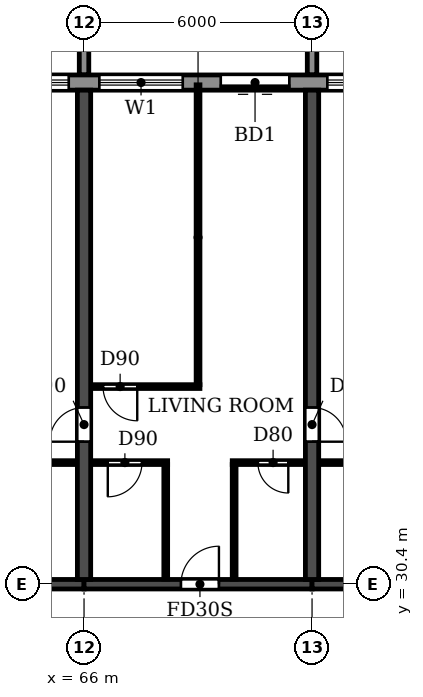
"""IFC4 building model, lengths in metres.
Left out: names, types, materials, properties, quantities, classifications, styles, units other than length and angle.
Written with IfcOpenShell. Run it as: python <this file> out.ifc"""

import sys

from ifc_helpers import new_model, si_unit, direction, frame, frame_2d, origin, place, context, subcontext, project, spatial, polyline, rectangle, outline, extrude, source, transform, mapped, element, fill, save


model = new_model("IFC4")
c1 = context("Model", 3, precision=1e-05, world=origin(), true_north=direction((0.0, 1.0)))
c2 = subcontext(c1, "Body", "Model", "MODEL_VIEW")
j1 = project(units=[si_unit("LENGTHUNIT", "METRE"), si_unit("PLANEANGLEUNIT", "RADIAN")], contexts=[c1])
p1 = place(None, origin())
s1 = spatial("IfcSite", under=j1, at=p1, CompositionType="ELEMENT")
p2 = place(p1, origin())
s2 = spatial("IfcBuilding", under=s1, at=p2, CompositionType="ELEMENT")
p3 = place(p2, frame((0.0, 0.0, 72.9)))
s3 = spatial("IfcBuildingStorey", under=s2, at=p3, CompositionType="ELEMENT", Elevation=72.9)
p4 = place(p3, frame((66.0, 30.525, 0.0), z_axis=(0.0, 0.0, 1.0), x_axis=(0.0, 1.0, 0.0)))
e1 = element("IfcWall", 1, at=p4, inside=s3, PredefinedType="SHEAR", context=c2, shape_type="SweptSolid", body=[
    extrude(rectangle(XDim=12.875, YDim=0.35, at=frame_2d((6.438, 0.0))), origin(), (0.0, 0.0, 1.0), 3.06),
])
p5 = place(p4, frame((3.625, 0.0, 0.0)))
e2 = element("IfcOpeningElement", 2, at=p5, cuts=e1, PredefinedType="OPENING", context=c2, shape_type="SweptSolid", body=[
    extrude(rectangle(XDim=0.9, YDim=2.1, at=frame_2d((0.45, 1.05))), frame((0.0, 0.185, 0.0), z_axis=(0.0, -1.0, 0.0), x_axis=(1.0, 0.0, 0.0)), (0.0, 0.0, 1.0), 0.37),
])
p6 = place(p3, frame((72.0, 30.525, 0.0), z_axis=(0.0, 0.0, 1.0), x_axis=(0.0, 1.0, 0.0)))
e3 = element("IfcWall", 3, at=p6, inside=s3, PredefinedType="SHEAR", context=c2, shape_type="SweptSolid", body=[
    extrude(rectangle(XDim=12.875, YDim=0.35, at=frame_2d((6.438, 0.0))), origin(), (0.0, 0.0, 1.0), 3.06),
])
p7 = place(p6, frame((3.625, 0.0, 0.0)))
e4 = element("IfcOpeningElement", 4, at=p7, cuts=e3, PredefinedType="OPENING", context=c2, shape_type="SweptSolid", body=[
    extrude(rectangle(XDim=0.9, YDim=2.1, at=frame_2d((0.45, 1.05))), frame((0.0, 0.185, 0.0), z_axis=(0.0, -1.0, 0.0), x_axis=(1.0, 0.0, 0.0)), (0.0, 0.0, 1.0), 0.37),
])
p8 = place(p3, frame((60.0, 30.4, 0.0), z_axis=(0.0, 0.0, 1.0), x_axis=(1.0, 0.0, 0.0)))
e5 = element("IfcWall", 5, at=p8, inside=s3, PredefinedType="SHEAR", context=c2, shape_type="SweptSolid", body=[
    extrude(rectangle(XDim=6.0, YDim=0.25, at=frame_2d((3.0, 0.0))), origin(), (0.0, 0.0, 1.0), 2.46),
])
p9 = place(p3, frame((66.0, 30.4, 0.0), z_axis=(0.0, 0.0, 1.0), x_axis=(1.0, 0.0, 0.0)))
e6 = element("IfcWall", 6, at=p9, inside=s3, PredefinedType="SHEAR", context=c2, shape_type="SweptSolid", body=[
    extrude(rectangle(XDim=6.0, YDim=0.25, at=frame_2d((3.0, 0.0))), origin(), (0.0, 0.0, 1.0), 2.46),
])
p10 = place(p9, frame((2.55, 0.0, 0.0)))
e7 = element("IfcOpeningElement", 7, at=p10, cuts=e6, PredefinedType="OPENING", context=c2, shape_type="SweptSolid", body=[
    extrude(rectangle(XDim=1.0, YDim=2.1, at=frame_2d((0.5, 1.05))), frame((0.0, 0.135, 0.0), z_axis=(0.0, -1.0, 0.0), x_axis=(1.0, 0.0, 0.0)), (0.0, 0.0, 1.0), 0.27),
])
p11 = place(p3, frame((72.0, 30.4, 0.0), z_axis=(0.0, 0.0, 1.0), x_axis=(1.0, 0.0, 0.0)))
e8 = element("IfcWall", 8, at=p11, inside=s3, PredefinedType="SHEAR", context=c2, shape_type="SweptSolid", body=[
    extrude(rectangle(XDim=6.0, YDim=0.25, at=frame_2d((3.0, 0.0))), origin(), (0.0, 0.0, 1.0), 2.46),
])
p12 = place(p3, frame((91.317, 43.6, 0.0), z_axis=(0.0, 0.0, 1.0), x_axis=(-1.0, 0.0, 0.0)))
e9 = element("IfcWall", 9, at=p12, inside=s3, PredefinedType="STANDARD", context=c2, shape_type="SweptSolid", body=[
    extrude(rectangle(XDim=80.634, YDim=0.4, at=frame_2d((40.317, 0.0))), origin(), (0.0, 0.0, 1.0), 3.06),
])
p13 = place(p12, frame((76.717, 0.0, 0.9)))
e10 = element("IfcOpeningElement", 10, at=p13, cuts=e9, PredefinedType="OPENING", context=c2, shape_type="SweptSolid", body=[
    extrude(rectangle(XDim=2.2, YDim=1.5, at=frame_2d((1.1, 0.75))), frame((0.0, 0.21, 0.0), z_axis=(0.0, -1.0, 0.0), x_axis=(1.0, 0.0, 0.0)), (0.0, 0.0, 1.0), 0.42),
])
p14 = place(p12, frame((73.917, 0.0, 0.0)))
e11 = element("IfcOpeningElement", 11, at=p14, cuts=e9, PredefinedType="OPENING", context=c2, shape_type="SweptSolid", body=[
    extrude(rectangle(XDim=1.8, YDim=2.4, at=frame_2d((0.9, 1.2))), frame((0.0, 0.21, 0.0), z_axis=(0.0, -1.0, 0.0), x_axis=(1.0, 0.0, 0.0)), (0.0, 0.0, 1.0), 0.42),
])
p15 = place(p12, frame((70.917, 0.0, 0.0)))
e12 = element("IfcOpeningElement", 12, at=p15, cuts=e9, PredefinedType="OPENING", context=c2, shape_type="SweptSolid", body=[
    extrude(rectangle(XDim=1.8, YDim=2.4, at=frame_2d((0.9, 1.2))), frame((0.0, 0.21, 0.0), z_axis=(0.0, -1.0, 0.0), x_axis=(1.0, 0.0, 0.0)), (0.0, 0.0, 1.0), 0.42),
])
p16 = place(p12, frame((67.717, 0.0, 0.9)))
e13 = element("IfcOpeningElement", 13, at=p16, cuts=e9, PredefinedType="OPENING", context=c2, shape_type="SweptSolid", body=[
    extrude(rectangle(XDim=2.2, YDim=1.5, at=frame_2d((1.1, 0.75))), frame((0.0, 0.21, 0.0), z_axis=(0.0, -1.0, 0.0), x_axis=(1.0, 0.0, 0.0)), (0.0, 0.0, 1.0), 0.42),
])
p17 = place(p12, frame((64.717, 0.0, 0.9)))
e14 = element("IfcOpeningElement", 14, at=p17, cuts=e9, PredefinedType="OPENING", context=c2, shape_type="SweptSolid", body=[
    extrude(rectangle(XDim=2.2, YDim=1.5, at=frame_2d((1.1, 0.75))), frame((0.0, 0.21, 0.0), z_axis=(0.0, -1.0, 0.0), x_axis=(1.0, 0.0, 0.0)), (0.0, 0.0, 1.0), 0.42),
])
p18 = place(p12, frame((61.917, 0.0, 0.0)))
e15 = element("IfcOpeningElement", 15, at=p18, cuts=e9, PredefinedType="OPENING", context=c2, shape_type="SweptSolid", body=[
    extrude(rectangle(XDim=1.8, YDim=2.4, at=frame_2d((0.9, 1.2))), frame((0.0, 0.21, 0.0), z_axis=(0.0, -1.0, 0.0), x_axis=(1.0, 0.0, 0.0)), (0.0, 0.0, 1.0), 0.42),
])
p19 = place(p12, frame((58.717, 0.0, 0.9)))
e16 = element("IfcOpeningElement", 16, at=p19, cuts=e9, PredefinedType="OPENING", context=c2, shape_type="SweptSolid", body=[
    extrude(rectangle(XDim=2.2, YDim=1.5, at=frame_2d((1.1, 0.75))), frame((0.0, 0.21, 0.0), z_axis=(0.0, -1.0, 0.0), x_axis=(1.0, 0.0, 0.0)), (0.0, 0.0, 1.0), 0.42),
])
p20 = place(p12, frame((55.917, 0.0, 0.0)))
e17 = element("IfcOpeningElement", 17, at=p20, cuts=e9, PredefinedType="OPENING", context=c2, shape_type="SweptSolid", body=[
    extrude(rectangle(XDim=1.8, YDim=2.4, at=frame_2d((0.9, 1.2))), frame((0.0, 0.21, 0.0), z_axis=(0.0, -1.0, 0.0), x_axis=(1.0, 0.0, 0.0)), (0.0, 0.0, 1.0), 0.42),
])
p21 = place(p12, frame((52.717, 0.0, 0.9)))
e18 = element("IfcOpeningElement", 18, at=p21, cuts=e9, PredefinedType="OPENING", context=c2, shape_type="SweptSolid", body=[
    extrude(rectangle(XDim=2.2, YDim=1.5, at=frame_2d((1.1, 0.75))), frame((0.0, 0.21, 0.0), z_axis=(0.0, -1.0, 0.0), x_axis=(1.0, 0.0, 0.0)), (0.0, 0.0, 1.0), 0.42),
])
p22 = place(p12, frame((49.717, 0.0, 0.9)))
e19 = element("IfcOpeningElement", 19, at=p22, cuts=e9, PredefinedType="OPENING", context=c2, shape_type="SweptSolid", body=[
    extrude(rectangle(XDim=2.2, YDim=1.5, at=frame_2d((1.1, 0.75))), frame((0.0, 0.21, 0.0), z_axis=(0.0, -1.0, 0.0), x_axis=(1.0, 0.0, 0.0)), (0.0, 0.0, 1.0), 0.42),
])
p23 = place(p12, frame((46.917, 0.0, 0.0)))
e20 = element("IfcOpeningElement", 20, at=p23, cuts=e9, PredefinedType="OPENING", context=c2, shape_type="SweptSolid", body=[
    extrude(rectangle(XDim=1.8, YDim=2.4, at=frame_2d((0.9, 1.2))), frame((0.0, 0.21, 0.0), z_axis=(0.0, -1.0, 0.0), x_axis=(1.0, 0.0, 0.0)), (0.0, 0.0, 1.0), 0.42),
])
p24 = place(p12, frame((43.717, 0.0, 0.9)))
e21 = element("IfcOpeningElement", 21, at=p24, cuts=e9, PredefinedType="OPENING", context=c2, shape_type="SweptSolid", body=[
    extrude(rectangle(XDim=2.2, YDim=1.5, at=frame_2d((1.1, 0.75))), frame((0.0, 0.21, 0.0), z_axis=(0.0, -1.0, 0.0), x_axis=(1.0, 0.0, 0.0)), (0.0, 0.0, 1.0), 0.42),
])
p25 = place(p12, frame((40.717, 0.0, 0.9)))
e22 = element("IfcOpeningElement", 22, at=p25, cuts=e9, PredefinedType="OPENING", context=c2, shape_type="SweptSolid", body=[
    extrude(rectangle(XDim=2.2, YDim=1.5, at=frame_2d((1.1, 0.75))), frame((0.0, 0.21, 0.0), z_axis=(0.0, -1.0, 0.0), x_axis=(1.0, 0.0, 0.0)), (0.0, 0.0, 1.0), 0.42),
])
p26 = place(p12, frame((37.917, 0.0, 0.0)))
e23 = element("IfcOpeningElement", 23, at=p26, cuts=e9, PredefinedType="OPENING", context=c2, shape_type="SweptSolid", body=[
    extrude(rectangle(XDim=1.8, YDim=2.4, at=frame_2d((0.9, 1.2))), frame((0.0, 0.21, 0.0), z_axis=(0.0, -1.0, 0.0), x_axis=(1.0, 0.0, 0.0)), (0.0, 0.0, 1.0), 0.42),
])
p27 = place(p12, frame((34.717, 0.0, 0.9)))
e24 = element("IfcOpeningElement", 24, at=p27, cuts=e9, PredefinedType="OPENING", context=c2, shape_type="SweptSolid", body=[
    extrude(rectangle(XDim=2.2, YDim=1.5, at=frame_2d((1.1, 0.75))), frame((0.0, 0.21, 0.0), z_axis=(0.0, -1.0, 0.0), x_axis=(1.0, 0.0, 0.0)), (0.0, 0.0, 1.0), 0.42),
])
p28 = place(p12, frame((31.917, 0.0, 0.0)))
e25 = element("IfcOpeningElement", 25, at=p28, cuts=e9, PredefinedType="OPENING", context=c2, shape_type="SweptSolid", body=[
    extrude(rectangle(XDim=1.8, YDim=2.4, at=frame_2d((0.9, 1.2))), frame((0.0, 0.21, 0.0), z_axis=(0.0, -1.0, 0.0), x_axis=(1.0, 0.0, 0.0)), (0.0, 0.0, 1.0), 0.42),
])
p29 = place(p12, frame((28.717, 0.0, 0.9)))
e26 = element("IfcOpeningElement", 26, at=p29, cuts=e9, PredefinedType="OPENING", context=c2, shape_type="SweptSolid", body=[
    extrude(rectangle(XDim=2.2, YDim=1.5, at=frame_2d((1.1, 0.75))), frame((0.0, 0.21, 0.0), z_axis=(0.0, -1.0, 0.0), x_axis=(1.0, 0.0, 0.0)), (0.0, 0.0, 1.0), 0.42),
])
p30 = place(p12, frame((25.717, 0.0, 0.9)))
e27 = element("IfcOpeningElement", 27, at=p30, cuts=e9, PredefinedType="OPENING", context=c2, shape_type="SweptSolid", body=[
    extrude(rectangle(XDim=2.2, YDim=1.5, at=frame_2d((1.1, 0.75))), frame((0.0, 0.21, 0.0), z_axis=(0.0, -1.0, 0.0), x_axis=(1.0, 0.0, 0.0)), (0.0, 0.0, 1.0), 0.42),
])
p31 = place(p12, frame((22.717, 0.0, 0.9)))
e28 = element("IfcOpeningElement", 28, at=p31, cuts=e9, PredefinedType="OPENING", context=c2, shape_type="SweptSolid", body=[
    extrude(rectangle(XDim=2.2, YDim=1.5, at=frame_2d((1.1, 0.75))), frame((0.0, 0.21, 0.0), z_axis=(0.0, -1.0, 0.0), x_axis=(1.0, 0.0, 0.0)), (0.0, 0.0, 1.0), 0.42),
])
p32 = place(p12, frame((19.917, 0.0, 0.0)))
e29 = element("IfcOpeningElement", 29, at=p32, cuts=e9, PredefinedType="OPENING", context=c2, shape_type="SweptSolid", body=[
    extrude(rectangle(XDim=1.8, YDim=2.4, at=frame_2d((0.9, 1.2))), frame((0.0, 0.21, 0.0), z_axis=(0.0, -1.0, 0.0), x_axis=(1.0, 0.0, 0.0)), (0.0, 0.0, 1.0), 0.42),
])
p33 = place(p12, frame((16.717, 0.0, 0.9)))
e30 = element("IfcOpeningElement", 30, at=p33, cuts=e9, PredefinedType="OPENING", context=c2, shape_type="SweptSolid", body=[
    extrude(rectangle(XDim=2.2, YDim=1.5, at=frame_2d((1.1, 0.75))), frame((0.0, 0.21, 0.0), z_axis=(0.0, -1.0, 0.0), x_axis=(1.0, 0.0, 0.0)), (0.0, 0.0, 1.0), 0.42),
])
p34 = place(p12, frame((13.717, 0.0, 0.9)))
e31 = element("IfcOpeningElement", 31, at=p34, cuts=e9, PredefinedType="OPENING", context=c2, shape_type="SweptSolid", body=[
    extrude(rectangle(XDim=2.2, YDim=1.5, at=frame_2d((1.1, 0.75))), frame((0.0, 0.21, 0.0), z_axis=(0.0, -1.0, 0.0), x_axis=(1.0, 0.0, 0.0)), (0.0, 0.0, 1.0), 0.42),
])
p35 = place(p12, frame((10.717, 0.0, 0.9)))
e32 = element("IfcOpeningElement", 32, at=p35, cuts=e9, PredefinedType="OPENING", context=c2, shape_type="SweptSolid", body=[
    extrude(rectangle(XDim=2.2, YDim=1.5, at=frame_2d((1.1, 0.75))), frame((0.0, 0.21, 0.0), z_axis=(0.0, -1.0, 0.0), x_axis=(1.0, 0.0, 0.0)), (0.0, 0.0, 1.0), 0.42),
])
p36 = place(p12, frame((7.917, 0.0, 0.0)))
e33 = element("IfcOpeningElement", 33, at=p36, cuts=e9, PredefinedType="OPENING", context=c2, shape_type="SweptSolid", body=[
    extrude(rectangle(XDim=1.8, YDim=2.4, at=frame_2d((0.9, 1.2))), frame((0.0, 0.21, 0.0), z_axis=(0.0, -1.0, 0.0), x_axis=(1.0, 0.0, 0.0)), (0.0, 0.0, 1.0), 0.42),
])
p37 = place(p12, frame((4.717, 0.0, 0.9)))
e34 = element("IfcOpeningElement", 34, at=p37, cuts=e9, PredefinedType="OPENING", context=c2, shape_type="SweptSolid", body=[
    extrude(rectangle(XDim=2.2, YDim=1.5, at=frame_2d((1.1, 0.75))), frame((0.0, 0.21, 0.0), z_axis=(0.0, -1.0, 0.0), x_axis=(1.0, 0.0, 0.0)), (0.0, 0.0, 1.0), 0.42),
])
p38 = place(p12, frame((1.917, 0.0, 0.0)))
e35 = element("IfcOpeningElement", 35, at=p38, cuts=e9, PredefinedType="OPENING", context=c2, shape_type="SweptSolid", body=[
    extrude(rectangle(XDim=1.8, YDim=2.4, at=frame_2d((0.9, 1.2))), frame((0.0, 0.21, 0.0), z_axis=(0.0, -1.0, 0.0), x_axis=(1.0, 0.0, 0.0)), (0.0, 0.0, 1.0), 0.42),
])
m1 = source(origin(), c2, "Body", "SweptSolid", [
    extrude(outline(polyline([(0.0, 0.0), (0.25, 0.0), (0.25, 3.1), (0.0, 3.1), (0.0, 0.0)])), origin(), (0.0, 0.0, 1.0), 3.1),
])
for number, where in (
    (36, (65.875, 43.8, 0.0)),
    (37, (71.875, 43.8, 0.0)),
):
    element("IfcWall", number, at=place(p3, frame(where)), inside=s3, PredefinedType="STANDARD", context=c2, shape_type="MappedRepresentation", body=[
        mapped(m1, transform((0.0, 0.0, 0.0))),
    ])
p39 = place(p3, frame((63.1, 33.6, 0.0), z_axis=(0.0, 0.0, 1.0), x_axis=(1.0, 0.0, 0.0)))
e38 = element("IfcWall", 38, at=p39, inside=s3, PredefinedType="PARTITIONING", context=c2, shape_type="SweptSolid", body=[
    extrude(rectangle(XDim=2.715, YDim=0.1, at=frame_2d((1.357, 0.0))), origin(), (0.0, 0.0, 1.0), 3.06),
])
p40 = place(p39, frame((1.0, 0.0, 0.0)))
e39 = element("IfcOpeningElement", 39, at=p40, cuts=e38, PredefinedType="OPENING", context=c2, shape_type="SweptSolid", body=[
    extrude(rectangle(XDim=0.8, YDim=2.1, at=frame_2d((0.4, 1.05))), frame((0.0, 0.06, 0.0), z_axis=(0.0, -1.0, 0.0), x_axis=(1.0, 0.0, 0.0)), (0.0, 0.0, 1.0), 0.12),
])
p41 = place(p3, frame((66.185, 33.6, 0.0), z_axis=(0.0, 0.0, 1.0), x_axis=(1.0, 0.0, 0.0)))
e40 = element("IfcWall", 40, at=p41, inside=s3, PredefinedType="PARTITIONING", context=c2, shape_type="SweptSolid", body=[
    extrude(rectangle(XDim=2.015, YDim=0.1, at=frame_2d((1.007, 0.0))), origin(), (0.0, 0.0, 1.0), 3.06),
])
p42 = place(p41, frame((0.44, 0.0, 0.0)))
e41 = element("IfcOpeningElement", 41, at=p42, cuts=e40, PredefinedType="OPENING", context=c2, shape_type="SweptSolid", body=[
    extrude(rectangle(XDim=0.9, YDim=2.1, at=frame_2d((0.45, 1.05))), frame((0.0, 0.06, 0.0), z_axis=(0.0, -1.0, 0.0), x_axis=(1.0, 0.0, 0.0)), (0.0, 0.0, 1.0), 0.12),
])
p43 = place(p3, frame((69.9, 33.6, 0.0), z_axis=(0.0, 0.0, 1.0), x_axis=(1.0, 0.0, 0.0)))
e42 = element("IfcWall", 42, at=p43, inside=s3, PredefinedType="PARTITIONING", context=c2, shape_type="SweptSolid", body=[
    extrude(rectangle(XDim=1.915, YDim=0.1, at=frame_2d((0.958, 0.0))), origin(), (0.0, 0.0, 1.0), 3.06),
])
p44 = place(p43, frame((0.675, 0.0, 0.0)))
e43 = element("IfcOpeningElement", 43, at=p44, cuts=e42, PredefinedType="OPENING", context=c2, shape_type="SweptSolid", body=[
    extrude(rectangle(XDim=0.8, YDim=2.1, at=frame_2d((0.4, 1.05))), frame((0.0, 0.06, 0.0), z_axis=(0.0, -1.0, 0.0), x_axis=(1.0, 0.0, 0.0)), (0.0, 0.0, 1.0), 0.12),
])
p45 = place(p3, frame((72.185, 33.6, 0.0), z_axis=(0.0, 0.0, 1.0), x_axis=(1.0, 0.0, 0.0)))
e44 = element("IfcWall", 44, at=p45, inside=s3, PredefinedType="PARTITIONING", context=c2, shape_type="SweptSolid", body=[
    extrude(rectangle(XDim=2.715, YDim=0.1, at=frame_2d((1.357, 0.0))), origin(), (0.0, 0.0, 1.0), 3.06),
])
p46 = place(p45, frame((0.915, 0.0, 0.0)))
e45 = element("IfcOpeningElement", 45, at=p46, cuts=e44, PredefinedType="OPENING", context=c2, shape_type="SweptSolid", body=[
    extrude(rectangle(XDim=0.8, YDim=2.1, at=frame_2d((0.4, 1.05))), frame((0.0, 0.06, 0.0), z_axis=(0.0, -1.0, 0.0), x_axis=(1.0, 0.0, 0.0)), (0.0, 0.0, 1.0), 0.12),
])
p47 = place(p3, frame((66.185, 35.6, 0.0), z_axis=(0.0, 0.0, 1.0), x_axis=(1.0, 0.0, 0.0)))
e46 = element("IfcWall", 46, at=p47, inside=s3, PredefinedType="PARTITIONING", context=c2, shape_type="SweptSolid", body=[
    extrude(rectangle(XDim=2.865, YDim=0.1, at=frame_2d((1.433, 0.0))), origin(), (0.0, 0.0, 1.0), 3.06),
])
p48 = place(p47, frame((0.315, 0.0, 0.0)))
e47 = element("IfcOpeningElement", 47, at=p48, cuts=e46, PredefinedType="OPENING", context=c2, shape_type="SweptSolid", body=[
    extrude(rectangle(XDim=0.9, YDim=2.1, at=frame_2d((0.45, 1.05))), frame((0.0, 0.06, 0.0), z_axis=(0.0, -1.0, 0.0), x_axis=(1.0, 0.0, 0.0)), (0.0, 0.0, 1.0), 0.12),
])
p49 = place(p3, frame((68.15, 30.535, 0.0), z_axis=(0.0, 0.0, 1.0), x_axis=(0.0, 1.0, 0.0)))
e48 = element("IfcWall", 48, at=p49, inside=s3, PredefinedType="PARTITIONING", context=c2, shape_type="SweptSolid", body=[
    extrude(rectangle(XDim=3.015, YDim=0.1, at=frame_2d((1.508, 0.0))), origin(), (0.0, 0.0, 1.0), 3.06),
])
p50 = place(p3, frame((69.0, 35.65, 0.0), z_axis=(0.0, 0.0, 1.0), x_axis=(0.0, 1.0, 0.0)))
e49 = element("IfcWall", 49, at=p50, inside=s3, PredefinedType="PARTITIONING", context=c2, shape_type="SweptSolid", body=[
    extrude(rectangle(XDim=7.89, YDim=0.1, at=frame_2d((3.945, 0.0))), origin(), (0.0, 0.0, 1.0), 3.06),
])
p51 = place(p3, frame((69.95, 30.535, 0.0), z_axis=(0.0, 0.0, 1.0), x_axis=(0.0, 1.0, 0.0)))
e50 = element("IfcWall", 50, at=p51, inside=s3, PredefinedType="PARTITIONING", context=c2, shape_type="SweptSolid", body=[
    extrude(rectangle(XDim=3.015, YDim=0.1, at=frame_2d((1.508, 0.0))), origin(), (0.0, 0.0, 1.0), 3.06),
])
p52 = place(p30, origin())
e51 = element("IfcWindow", 51, at=p52, inside=s3, PartitioningType="DOUBLE_PANEL_HORIZONTAL", PredefinedType="WINDOW", context=c2, shape_type="SweptSolid", body=[
    extrude(rectangle(XDim=2.2, YDim=1.5, at=frame_2d((1.1, 0.75))), frame((0.0, 0.03, 0.0), z_axis=(0.0, -1.0, 0.0), x_axis=(1.0, 0.0, 0.0)), (0.0, 0.0, 1.0), 0.06),
])
fill(e27, e51)
p53 = place(p31, origin())
e52 = element("IfcWindow", 52, at=p53, inside=s3, PartitioningType="DOUBLE_PANEL_HORIZONTAL", PredefinedType="WINDOW", context=c2, shape_type="SweptSolid", body=[
    extrude(rectangle(XDim=2.2, YDim=1.5, at=frame_2d((1.1, 0.75))), frame((0.0, 0.03, 0.0), z_axis=(0.0, -1.0, 0.0), x_axis=(1.0, 0.0, 0.0)), (0.0, 0.0, 1.0), 0.06),
])
fill(e28, e52)
p54 = place(p32, origin())
e53 = element("IfcDoor", 53, at=p54, inside=s3, OperationType="DOUBLE_DOOR_SLIDING", PredefinedType="DOOR", context=c2, shape_type="SweptSolid", body=[
    extrude(rectangle(XDim=1.8, YDim=2.4, at=frame_2d((0.9, 1.2))), frame((0.0, 0.025, 0.0), z_axis=(0.0, -1.0, 0.0), x_axis=(1.0, 0.0, 0.0)), (0.0, 0.0, 1.0), 0.05),
])
fill(e29, e53)
p55 = place(p33, origin())
e54 = element("IfcWindow", 54, at=p55, inside=s3, PartitioningType="DOUBLE_PANEL_HORIZONTAL", PredefinedType="WINDOW", context=c2, shape_type="SweptSolid", body=[
    extrude(rectangle(XDim=2.2, YDim=1.5, at=frame_2d((1.1, 0.75))), frame((0.0, 0.03, 0.0), z_axis=(0.0, -1.0, 0.0), x_axis=(1.0, 0.0, 0.0)), (0.0, 0.0, 1.0), 0.06),
])
fill(e30, e54)
p56 = place(p5, origin())
e55 = element("IfcDoor", 55, at=p56, inside=s3, OperationType="SINGLE_SWING_LEFT", PredefinedType="DOOR", context=c2, shape_type="SweptSolid", body=[
    extrude(rectangle(XDim=0.9, YDim=2.1, at=frame_2d((0.45, 1.05))), frame((0.0, 0.025, 0.0), z_axis=(0.0, -1.0, 0.0), x_axis=(1.0, 0.0, 0.0)), (0.0, 0.0, 1.0), 0.05),
])
fill(e2, e55)
p57 = place(p48, frame((0.9, 0.0, 0.0), z_axis=(0.0, 0.0, 1.0), x_axis=(-1.0, 0.0, 0.0)))
e56 = element("IfcDoor", 56, at=p57, inside=s3, OperationType="SINGLE_SWING_LEFT", PredefinedType="DOOR", context=c2, shape_type="SweptSolid", body=[
    extrude(rectangle(XDim=0.9, YDim=2.1, at=frame_2d((0.45, 1.05))), frame((0.0, 0.025, 0.0), z_axis=(0.0, -1.0, 0.0), x_axis=(1.0, 0.0, 0.0)), (0.0, 0.0, 1.0), 0.05),
])
fill(e47, e56)
p58 = place(p42, frame((0.9, 0.0, 0.0), z_axis=(0.0, 0.0, 1.0), x_axis=(-1.0, 0.0, 0.0)))
e57 = element("IfcDoor", 57, at=p58, inside=s3, OperationType="SINGLE_SWING_RIGHT", PredefinedType="DOOR", context=c2, shape_type="SweptSolid", body=[
    extrude(rectangle(XDim=0.9, YDim=2.1, at=frame_2d((0.45, 1.05))), frame((0.0, 0.025, 0.0), z_axis=(0.0, -1.0, 0.0), x_axis=(1.0, 0.0, 0.0)), (0.0, 0.0, 1.0), 0.05),
])
fill(e41, e57)
p59 = place(p10, origin())
e58 = element("IfcDoor", 58, at=p59, inside=s3, OperationType="SINGLE_SWING_RIGHT", PredefinedType="DOOR", context=c2, shape_type="SweptSolid", body=[
    extrude(rectangle(XDim=1.0, YDim=2.1, at=frame_2d((0.5, 1.05))), frame((0.0, 0.025, 0.0), z_axis=(0.0, -1.0, 0.0), x_axis=(1.0, 0.0, 0.0)), (0.0, 0.0, 1.0), 0.05),
])
fill(e7, e58)
p60 = place(p44, frame((0.8, 0.0, 0.0), z_axis=(0.0, 0.0, 1.0), x_axis=(-1.0, 0.0, 0.0)))
e59 = element("IfcDoor", 59, at=p60, inside=s3, OperationType="SINGLE_SWING_LEFT", PredefinedType="DOOR", context=c2, shape_type="SweptSolid", body=[
    extrude(rectangle(XDim=0.8, YDim=2.1, at=frame_2d((0.4, 1.05))), frame((0.0, 0.025, 0.0), z_axis=(0.0, -1.0, 0.0), x_axis=(1.0, 0.0, 0.0)), (0.0, 0.0, 1.0), 0.05),
])
fill(e43, e59)
p61 = place(p7, frame((0.9, 0.0, 0.0), z_axis=(0.0, 0.0, 1.0), x_axis=(-1.0, 0.0, 0.0)))
e60 = element("IfcDoor", 60, at=p61, inside=s3, OperationType="SINGLE_SWING_RIGHT", PredefinedType="DOOR", context=c2, shape_type="SweptSolid", body=[
    extrude(rectangle(XDim=0.9, YDim=2.1, at=frame_2d((0.45, 1.05))), frame((0.0, 0.025, 0.0), z_axis=(0.0, -1.0, 0.0), x_axis=(1.0, 0.0, 0.0)), (0.0, 0.0, 1.0), 0.05),
])
fill(e4, e60)
save(model, sys.argv[1])
